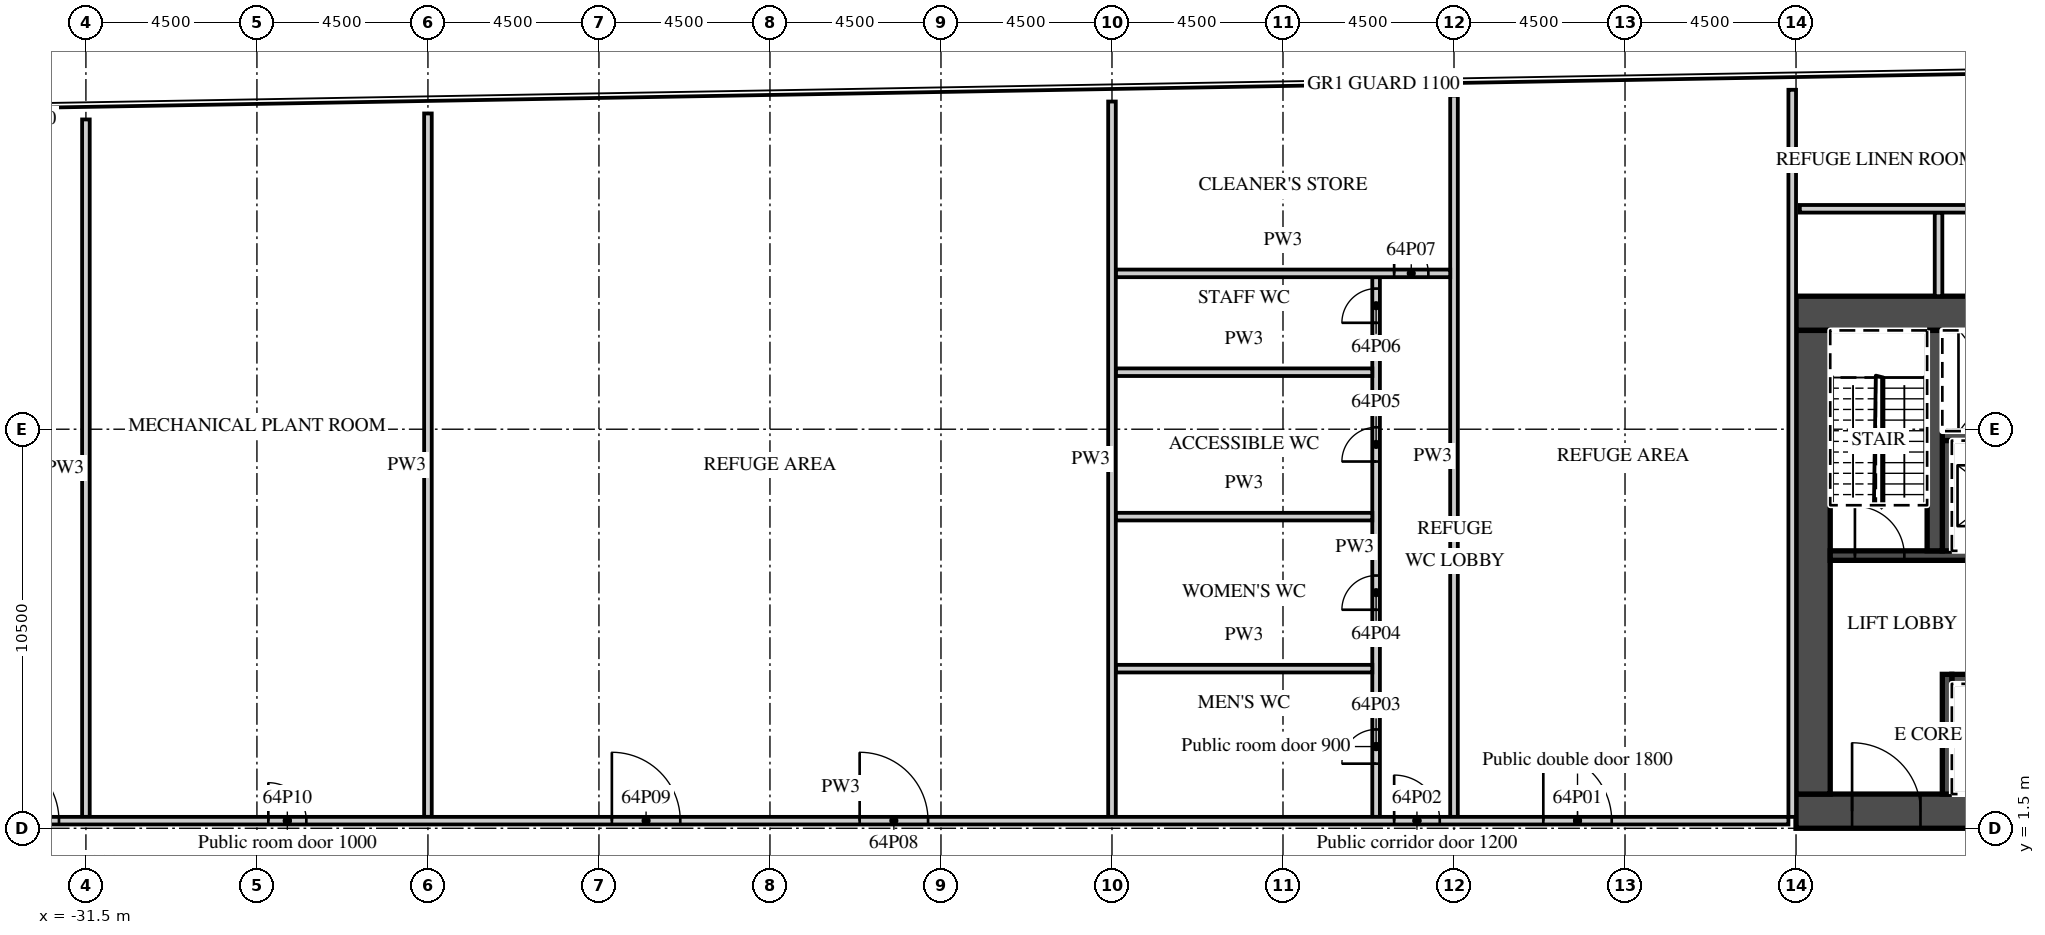
"""IFC4 building model, lengths in metres.
Left out: names, types, materials, properties, quantities, classifications, styles, units other than length and angle.
Written with IfcOpenShell. Run it as: python <this file> out.ifc"""

import sys

from ifc_helpers import new_model, si_unit, direction, frame, frame_2d, origin, place, context, subcontext, project, spatial, rectangle, extrude, element, fill, save


model = new_model("IFC4")
c1 = context("Model", 3, precision=1e-05, world=origin(), true_north=direction((0.0, 1.0)))
c2 = subcontext(c1, "Body", "Model", "MODEL_VIEW")
j1 = project(units=[si_unit("LENGTHUNIT", "METRE"), si_unit("PLANEANGLEUNIT", "RADIAN")], contexts=[c1])
p1 = place(None, origin())
s1 = spatial("IfcSite", under=j1, at=p1, CompositionType="ELEMENT")
p2 = place(p1, origin())
s2 = spatial("IfcBuilding", under=s1, at=p2, CompositionType="ELEMENT")
p3 = place(p2, frame((0.0, 0.0, 257.3)))
s3 = spatial("IfcBuildingStorey", under=s2, at=p3, CompositionType="ELEMENT", Elevation=257.3)
p4 = place(p3, frame((13.5, 1.95, 0.0), z_axis=(0.0, 0.0, 1.0), x_axis=(1.0, 0.0, 0.0)))
e1 = element("IfcWall", 1, at=p4, inside=s3, PredefinedType="SHEAR", context=c2, shape_type="SweptSolid", body=[
    extrude(rectangle(XDim=18.0, YDim=0.9, at=frame_2d((9.0, 0.0))), origin(), (0.0, 0.0, 1.0), 4.2),
])
p5 = place(p4, frame((1.475, 0.0, 0.0)))
e2 = element("IfcOpeningElement", 2, at=p5, cuts=e1, PredefinedType="OPENING", context=c2, shape_type="SweptSolid", body=[
    extrude(rectangle(XDim=1.8, YDim=2.1, at=frame_2d((0.9, 1.05))), frame((0.0, 0.46, 0.0), z_axis=(0.0, -1.0, 0.0), x_axis=(1.0, 0.0, 0.0)), (0.0, 0.0, 1.0), 0.92),
])
p6 = place(p3, frame((13.5, 15.05, 0.0), z_axis=(0.0, 0.0, 1.0), x_axis=(1.0, 0.0, 0.0)))
e3 = element("IfcWall", 3, at=p6, inside=s3, PredefinedType="SHEAR", context=c2, shape_type="SweptSolid", body=[
    extrude(rectangle(XDim=6.8, YDim=0.9, at=frame_2d((3.4, 0.0))), origin(), (0.0, 0.0, 1.0), 4.2),
])
p7 = place(p6, frame((4.725, 0.0, 0.0)))
e4 = element("IfcOpeningElement", 4, at=p7, cuts=e3, PredefinedType="OPENING", context=c2, shape_type="SweptSolid", body=[
    extrude(rectangle(XDim=1.2, YDim=2.1, at=frame_2d((0.6, 1.05))), frame((0.0, 0.46, 0.0), z_axis=(0.0, -1.0, 0.0), x_axis=(1.0, 0.0, 0.0)), (0.0, 0.0, 1.0), 0.92),
])
p8 = place(p3, frame((13.95, 2.4, 0.0), z_axis=(0.0, 0.0, 1.0), x_axis=(0.0, 1.0, 0.0)))
e5 = element("IfcWall", 5, at=p8, inside=s3, PredefinedType="SHEAR", context=c2, shape_type="SweptSolid", body=[
    extrude(rectangle(XDim=12.2, YDim=0.9, at=frame_2d((6.1, 0.0))), origin(), (0.0, 0.0, 1.0), 4.2),
])
p9 = place(p3, frame((17.6, 5.425, 0.0), z_axis=(0.0, 0.0, 1.0), x_axis=(1.0, 0.0, 0.0)))
e6 = element("IfcWall", 6, at=p9, inside=s3, PredefinedType="SHEAR", context=c2, shape_type="SweptSolid", body=[
    extrude(rectangle(XDim=13.0, YDim=0.25, at=frame_2d((6.5, 0.0))), origin(), (0.0, 0.0, 1.0), 4.2),
])
p10 = place(p9, frame((8.475, 0.0, 0.0)))
e7 = element("IfcOpeningElement", 7, at=p10, cuts=e6, PredefinedType="OPENING", context=c2, shape_type="SweptSolid", body=[
    extrude(rectangle(XDim=1.2, YDim=2.1, at=frame_2d((0.6, 1.05))), frame((0.0, 0.135, 0.0), z_axis=(0.0, -1.0, 0.0), x_axis=(1.0, 0.0, 0.0)), (0.0, 0.0, 1.0), 0.27),
])
p11 = place(p9, frame((5.875, 0.0, 0.0)))
e8 = element("IfcOpeningElement", 8, at=p11, cuts=e6, PredefinedType="OPENING", context=c2, shape_type="SweptSolid", body=[
    extrude(rectangle(XDim=1.2, YDim=2.1, at=frame_2d((0.6, 1.05))), frame((0.0, 0.135, 0.0), z_axis=(0.0, -1.0, 0.0), x_axis=(1.0, 0.0, 0.0)), (0.0, 0.0, 1.0), 0.27),
])
p12 = place(p3, frame((17.475, 2.4, 0.0), z_axis=(0.0, 0.0, 1.0), x_axis=(0.0, 1.0, 0.0)))
e9 = element("IfcWall", 9, at=p12, inside=s3, PredefinedType="SHEAR", context=c2, shape_type="SweptSolid", body=[
    extrude(rectangle(XDim=3.15, YDim=0.25, at=frame_2d((1.575, 0.0))), origin(), (0.0, 0.0, 1.0), 4.2),
])
p13 = place(p3, frame((14.4, 8.675, 0.0), z_axis=(0.0, 0.0, 1.0), x_axis=(1.0, 0.0, 0.0)))
e10 = element("IfcWall", 10, at=p13, inside=s3, PredefinedType="SHEAR", context=c2, shape_type="SweptSolid", body=[
    extrude(rectangle(XDim=16.2, YDim=0.25, at=frame_2d((8.1, 0.0))), origin(), (0.0, 0.0, 1.0), 4.2),
])
p14 = place(p13, frame((6.45, 0.0, 0.0)))
e11 = element("IfcOpeningElement", 11, at=p14, cuts=e10, PredefinedType="OPENING", context=c2, shape_type="SweptSolid", body=[
    extrude(rectangle(XDim=1.2, YDim=2.1, at=frame_2d((0.6, 1.05))), frame((0.0, 0.135, 0.0), z_axis=(0.0, -1.0, 0.0), x_axis=(1.0, 0.0, 0.0)), (0.0, 0.0, 1.0), 0.27),
])
p15 = place(p13, frame((3.8, 0.0, 0.0)))
e12 = element("IfcOpeningElement", 12, at=p15, cuts=e10, PredefinedType="OPENING", context=c2, shape_type="SweptSolid", body=[
    extrude(rectangle(XDim=1.2, YDim=2.1, at=frame_2d((0.6, 1.05))), frame((0.0, 0.135, 0.0), z_axis=(0.0, -1.0, 0.0), x_axis=(1.0, 0.0, 0.0)), (0.0, 0.0, 1.0), 0.27),
])
p16 = place(p13, frame((0.65, 0.0, 0.0)))
e13 = element("IfcOpeningElement", 13, at=p16, cuts=e10, PredefinedType="OPENING", context=c2, shape_type="SweptSolid", body=[
    extrude(rectangle(XDim=1.3, YDim=2.1, at=frame_2d((0.65, 1.05))), frame((0.0, 0.135, 0.0), z_axis=(0.0, -1.0, 0.0), x_axis=(1.0, 0.0, 0.0)), (0.0, 0.0, 1.0), 0.27),
])
p17 = place(p13, frame((14.113, 0.0, 0.0)))
e14 = element("IfcOpeningElement", 14, at=p17, cuts=e10, PredefinedType="OPENING", context=c2, shape_type="SweptSolid", body=[
    extrude(rectangle(XDim=1.0, YDim=2.1, at=frame_2d((0.5, 1.05))), frame((0.0, 0.135, 0.0), z_axis=(0.0, -1.0, 0.0), x_axis=(1.0, 0.0, 0.0)), (0.0, 0.0, 1.0), 0.27),
])
p18 = place(p13, frame((10.137, 0.0, 0.0)))
e15 = element("IfcOpeningElement", 15, at=p18, cuts=e10, PredefinedType="OPENING", context=c2, shape_type="SweptSolid", body=[
    extrude(rectangle(XDim=1.0, YDim=2.1, at=frame_2d((0.5, 1.05))), frame((0.0, 0.135, 0.0), z_axis=(0.0, -1.0, 0.0), x_axis=(1.0, 0.0, 0.0)), (0.0, 0.0, 1.0), 0.27),
])
p19 = place(p3, frame((17.35, 11.825, 0.0), z_axis=(0.0, 0.0, 1.0), x_axis=(1.0, 0.0, 0.0)))
e16 = element("IfcWall", 16, at=p19, inside=s3, PredefinedType="SHEAR", context=c2, shape_type="SweptSolid", body=[
    extrude(rectangle(XDim=13.25, YDim=0.25, at=frame_2d((6.625, 0.0))), origin(), (0.0, 0.0, 1.0), 4.2),
])
p20 = place(p3, frame((17.475, 8.8, 0.0), z_axis=(0.0, 0.0, 1.0), x_axis=(0.0, 1.0, 0.0)))
e17 = element("IfcWall", 17, at=p20, inside=s3, PredefinedType="SHEAR", context=c2, shape_type="SweptSolid", body=[
    extrude(rectangle(XDim=2.9, YDim=0.25, at=frame_2d((1.45, 0.0))), origin(), (0.0, 0.0, 1.0), 4.2),
])
p21 = place(p3, frame((17.15, 8.8, 0.0), z_axis=(0.0, 0.0, 1.0), x_axis=(0.0, 1.0, 0.0)))
e18 = element("IfcWall", 18, at=p21, inside=s3, PredefinedType="SHEAR", context=c2, shape_type="SweptSolid", body=[
    extrude(rectangle(XDim=5.8, YDim=0.4, at=frame_2d((2.9, 0.0))), origin(), (0.0, 0.0, 1.0), 4.2),
])
p22 = place(p3, frame((17.25, 15.5, 0.0), z_axis=(0.0, 0.0, 1.0), x_axis=(0.0, 1.0, 0.0)))
e19 = element("IfcWall", 19, at=p22, inside=s3, PredefinedType="PARTITIONING", context=c2, shape_type="SweptSolid", body=[
    extrude(rectangle(XDim=2.2, YDim=0.2, at=frame_2d((1.1, 0.0))), origin(), (0.0, 0.0, 1.0), 4.2),
])
p23 = place(p3, frame((13.6, 17.8, 0.0), z_axis=(0.0, 0.0, 1.0), x_axis=(1.0, 0.0, 0.0)))
e20 = element("IfcWall", 20, at=p23, inside=s3, PredefinedType="PARTITIONING", context=c2, shape_type="SweptSolid", body=[
    extrude(rectangle(XDim=28.657, YDim=0.2, at=frame_2d((14.329, 0.0))), origin(), (0.0, 0.0, 1.0), 4.2),
])
p24 = place(p23, frame((16.613, 0.0, 0.0)))
e21 = element("IfcOpeningElement", 21, at=p24, cuts=e20, PredefinedType="OPENING", context=c2, shape_type="SweptSolid", body=[
    extrude(rectangle(XDim=0.9, YDim=2.1, at=frame_2d((0.45, 1.05))), frame((0.0, 0.11, 0.0), z_axis=(0.0, -1.0, 0.0), x_axis=(1.0, 0.0, 0.0)), (0.0, 0.0, 1.0), 0.22),
])
p25 = place(p23, frame((8.312, 0.0, 0.0)))
e22 = element("IfcOpeningElement", 22, at=p25, cuts=e20, PredefinedType="OPENING", context=c2, shape_type="SweptSolid", body=[
    extrude(rectangle(XDim=0.9, YDim=2.1, at=frame_2d((0.45, 1.05))), frame((0.0, 0.11, 0.0), z_axis=(0.0, -1.0, 0.0), x_axis=(1.0, 0.0, 0.0)), (0.0, 0.0, 1.0), 0.22),
])
p26 = place(p3, frame((4.5, 1.8, 0.0), z_axis=(0.0, 0.0, 1.0), x_axis=(0.0, 1.0, 0.0)))
e23 = element("IfcWall", 23, at=p26, inside=s3, PredefinedType="PARTITIONING", context=c2, shape_type="SweptSolid", body=[
    extrude(rectangle(XDim=18.979, YDim=0.2, at=frame_2d((9.49, 0.0))), origin(), (0.0, 0.0, 1.0), 4.2),
])
p27 = place(p3, frame((2.45, 1.8, 0.0), z_axis=(0.0, 0.0, 1.0), x_axis=(0.0, 1.0, 0.0)))
e24 = element("IfcWall", 24, at=p27, inside=s3, PredefinedType="PARTITIONING", context=c2, shape_type="SweptSolid", body=[
    extrude(rectangle(XDim=14.201, YDim=0.2, at=frame_2d((7.1, 0.0))), origin(), (0.0, 0.0, 1.0), 4.2),
])
p28 = place(p27, frame((1.4, 0.0, 0.0)))
e25 = element("IfcOpeningElement", 25, at=p28, cuts=e24, PredefinedType="OPENING", context=c2, shape_type="SweptSolid", body=[
    extrude(rectangle(XDim=0.9, YDim=2.1, at=frame_2d((0.45, 1.05))), frame((0.0, 0.11, 0.0), z_axis=(0.0, -1.0, 0.0), x_axis=(1.0, 0.0, 0.0)), (0.0, 0.0, 1.0), 0.22),
])
p29 = place(p27, frame((5.45, 0.0, 0.0)))
e26 = element("IfcOpeningElement", 26, at=p29, cuts=e24, PredefinedType="OPENING", context=c2, shape_type="SweptSolid", body=[
    extrude(rectangle(XDim=0.9, YDim=2.1, at=frame_2d((0.45, 1.05))), frame((0.0, 0.11, 0.0), z_axis=(0.0, -1.0, 0.0), x_axis=(1.0, 0.0, 0.0)), (0.0, 0.0, 1.0), 0.22),
])
p30 = place(p27, frame((9.35, 0.0, 0.0)))
e27 = element("IfcOpeningElement", 27, at=p30, cuts=e24, PredefinedType="OPENING", context=c2, shape_type="SweptSolid", body=[
    extrude(rectangle(XDim=0.9, YDim=2.1, at=frame_2d((0.45, 1.05))), frame((0.0, 0.11, 0.0), z_axis=(0.0, -1.0, 0.0), x_axis=(1.0, 0.0, 0.0)), (0.0, 0.0, 1.0), 0.22),
])
p31 = place(p27, frame((13.0, 0.0, 0.0)))
e28 = element("IfcOpeningElement", 28, at=p31, cuts=e24, PredefinedType="OPENING", context=c2, shape_type="SweptSolid", body=[
    extrude(rectangle(XDim=0.9, YDim=2.1, at=frame_2d((0.45, 1.05))), frame((0.0, 0.11, 0.0), z_axis=(0.0, -1.0, 0.0), x_axis=(1.0, 0.0, 0.0)), (0.0, 0.0, 1.0), 0.22),
])
for number, where, z_axis, x_axis in (
    (29, (-4.4, 5.7, 0.0), (0.0, 0.0, 1.0), (1.0, 0.0, 0.0)),
    (30, (-4.4, 9.7, 0.0), (0.0, 0.0, 1.0), (1.0, 0.0, 0.0)),
    (31, (-4.4, 13.5, 0.0), (0.0, 0.0, 1.0), (1.0, 0.0, 0.0)),
):
    element("IfcWall", number, at=place(p3, frame(where, z_axis=z_axis, x_axis=x_axis)), inside=s3, PredefinedType="PARTITIONING", context=c2, shape_type="SweptSolid", body=[
        extrude(rectangle(XDim=6.75, YDim=0.2, at=frame_2d((3.375, 0.0))), origin(), (0.0, 0.0, 1.0), 4.2),
    ])
p32 = place(p3, frame((-4.4, 16.101, 0.0), z_axis=(0.0, 0.0, 1.0), x_axis=(1.0, 0.0, 0.0)))
e32 = element("IfcWall", 32, at=p32, inside=s3, PredefinedType="PARTITIONING", context=c2, shape_type="SweptSolid", body=[
    extrude(rectangle(XDim=8.8, YDim=0.2, at=frame_2d((4.4, 0.0))), origin(), (0.0, 0.0, 1.0), 4.2),
])
p33 = place(p32, frame((7.325, 0.0, 0.0)))
e33 = element("IfcOpeningElement", 33, at=p33, cuts=e32, PredefinedType="OPENING", context=c2, shape_type="SweptSolid", body=[
    extrude(rectangle(XDim=0.9, YDim=2.1, at=frame_2d((0.45, 1.05))), frame((0.0, 0.11, 0.0), z_axis=(0.0, -1.0, 0.0), x_axis=(1.0, 0.0, 0.0)), (0.0, 0.0, 1.0), 0.22),
])
p34 = place(p3, frame((-4.5, 1.8, 0.0), z_axis=(0.0, 0.0, 1.0), x_axis=(0.0, 1.0, 0.0)))
e34 = element("IfcWall", 34, at=p34, inside=s3, PredefinedType="PARTITIONING", context=c2, shape_type="SweptSolid", body=[
    extrude(rectangle(XDim=18.822, YDim=0.2, at=frame_2d((9.411, 0.0))), origin(), (0.0, 0.0, 1.0), 4.2),
])
p35 = place(p3, frame((-22.5, 1.8, 0.0), z_axis=(0.0, 0.0, 1.0), x_axis=(0.0, 1.0, 0.0)))
e35 = element("IfcWall", 35, at=p35, inside=s3, PredefinedType="PARTITIONING", context=c2, shape_type="SweptSolid", body=[
    extrude(rectangle(XDim=18.508, YDim=0.2, at=frame_2d((9.254, 0.0))), origin(), (0.0, 0.0, 1.0), 4.2),
])
p36 = place(p3, frame((-31.5, 1.8, 0.0), z_axis=(0.0, 0.0, 1.0), x_axis=(0.0, 1.0, 0.0)))
e36 = element("IfcWall", 36, at=p36, inside=s3, PredefinedType="PARTITIONING", context=c2, shape_type="SweptSolid", body=[
    extrude(rectangle(XDim=18.351, YDim=0.2, at=frame_2d((9.175, 0.0))), origin(), (0.0, 0.0, 1.0), 4.2),
])
p37 = place(p3, frame((-36.572, 1.7, 0.0), z_axis=(0.0, 0.0, 1.0), x_axis=(1.0, 0.0, 0.0)))
e37 = element("IfcWall", 37, at=p37, inside=s3, PredefinedType="PARTITIONING", context=c2, shape_type="SweptSolid", body=[
    extrude(rectangle(XDim=49.872, YDim=0.2, at=frame_2d((24.936, 0.0))), origin(), (0.0, 0.0, 1.0), 4.2),
])
p38 = place(p37, frame((43.422, 0.0, 0.0)))
e38 = element("IfcOpeningElement", 38, at=p38, cuts=e37, PredefinedType="OPENING", context=c2, shape_type="SweptSolid", body=[
    extrude(rectangle(XDim=1.8, YDim=2.1, at=frame_2d((0.9, 1.05))), frame((0.0, 0.11, 0.0), z_axis=(0.0, -1.0, 0.0), x_axis=(1.0, 0.0, 0.0)), (0.0, 0.0, 1.0), 0.22),
])
p39 = place(p37, frame((39.497, 0.0, 0.0)))
e39 = element("IfcOpeningElement", 39, at=p39, cuts=e37, PredefinedType="OPENING", context=c2, shape_type="SweptSolid", body=[
    extrude(rectangle(XDim=1.2, YDim=2.1, at=frame_2d((0.6, 1.05))), frame((0.0, 0.11, 0.0), z_axis=(0.0, -1.0, 0.0), x_axis=(1.0, 0.0, 0.0)), (0.0, 0.0, 1.0), 0.22),
])
p40 = place(p37, frame((25.432, 0.0, 0.0)))
e40 = element("IfcOpeningElement", 40, at=p40, cuts=e37, PredefinedType="OPENING", context=c2, shape_type="SweptSolid", body=[
    extrude(rectangle(XDim=1.8, YDim=2.1, at=frame_2d((0.9, 1.05))), frame((0.0, 0.11, 0.0), z_axis=(0.0, -1.0, 0.0), x_axis=(1.0, 0.0, 0.0)), (0.0, 0.0, 1.0), 0.22),
])
p41 = place(p37, frame((18.912, 0.0, 0.0)))
e41 = element("IfcOpeningElement", 41, at=p41, cuts=e37, PredefinedType="OPENING", context=c2, shape_type="SweptSolid", body=[
    extrude(rectangle(XDim=1.8, YDim=2.1, at=frame_2d((0.9, 1.05))), frame((0.0, 0.11, 0.0), z_axis=(0.0, -1.0, 0.0), x_axis=(1.0, 0.0, 0.0)), (0.0, 0.0, 1.0), 0.22),
])
p42 = place(p37, frame((9.872, 0.0, 0.0)))
e42 = element("IfcOpeningElement", 42, at=p42, cuts=e37, PredefinedType="OPENING", context=c2, shape_type="SweptSolid", body=[
    extrude(rectangle(XDim=1.0, YDim=2.1, at=frame_2d((0.5, 1.05))), frame((0.0, 0.11, 0.0), z_axis=(0.0, -1.0, 0.0), x_axis=(1.0, 0.0, 0.0)), (0.0, 0.0, 1.0), 0.22),
])
p43 = place(p37, frame((2.563, 0.0, 0.0)))
e43 = element("IfcOpeningElement", 43, at=p43, cuts=e37, PredefinedType="OPENING", context=c2, shape_type="SweptSolid", body=[
    extrude(rectangle(XDim=1.8, YDim=2.1, at=frame_2d((0.9, 1.05))), frame((0.0, 0.11, 0.0), z_axis=(0.0, -1.0, 0.0), x_axis=(1.0, 0.0, 0.0)), (0.0, 0.0, 1.0), 0.22),
])
p44 = place(p3, frame((13.4, 1.8, 0.0), z_axis=(0.0, 0.0, 1.0), x_axis=(0.0, 1.0, 0.0)))
e44 = element("IfcWall", 44, at=p44, inside=s3, PredefinedType="PARTITIONING", context=c2, shape_type="SweptSolid", body=[
    extrude(rectangle(XDim=19.131, YDim=0.2, at=frame_2d((9.565, 0.0))), origin(), (0.0, 0.0, 1.0), 4.2),
])
p45 = place(p5, origin())
e45 = element("IfcDoor", 45, at=p45, inside=s3, OperationType="DOUBLE_DOOR_DOUBLE_SWING", PredefinedType="DOOR", context=c2, shape_type="SweptSolid", body=[
    extrude(rectangle(XDim=1.8, YDim=2.1, at=frame_2d((0.9, 1.05))), frame((0.0, 0.025, 0.0), z_axis=(0.0, -1.0, 0.0), x_axis=(1.0, 0.0, 0.0)), (0.0, 0.0, 1.0), 0.05),
])
fill(e2, e45)
p46 = place(p16, origin())
e46 = element("IfcDoor", 46, at=p46, inside=s3, OperationType="SINGLE_SWING_LEFT", PredefinedType="DOOR", context=c2, shape_type="SweptSolid", body=[
    extrude(rectangle(XDim=1.3, YDim=2.1, at=frame_2d((0.65, 1.05))), frame((0.0, 0.025, 0.0), z_axis=(0.0, -1.0, 0.0), x_axis=(1.0, 0.0, 0.0)), (0.0, 0.0, 1.0), 0.05),
])
fill(e13, e46)
p47 = place(p38, origin())
e47 = element("IfcDoor", 47, at=p47, inside=s3, OperationType="DOUBLE_DOOR_DOUBLE_SWING", PredefinedType="DOOR", context=c2, shape_type="SweptSolid", body=[
    extrude(rectangle(XDim=1.8, YDim=2.1, at=frame_2d((0.9, 1.05))), frame((0.0, 0.025, 0.0), z_axis=(0.0, -1.0, 0.0), x_axis=(1.0, 0.0, 0.0)), (0.0, 0.0, 1.0), 0.05),
])
fill(e38, e47)
p48 = place(p39, origin())
e48 = element("IfcDoor", 48, at=p48, inside=s3, OperationType="SINGLE_SWING_LEFT", PredefinedType="DOOR", context=c2, shape_type="SweptSolid", body=[
    extrude(rectangle(XDim=1.2, YDim=2.1, at=frame_2d((0.6, 1.05))), frame((0.0, 0.025, 0.0), z_axis=(0.0, -1.0, 0.0), x_axis=(1.0, 0.0, 0.0)), (0.0, 0.0, 1.0), 0.05),
])
fill(e39, e48)
p49 = place(p28, origin())
e49 = element("IfcDoor", 49, at=p49, inside=s3, OperationType="SINGLE_SWING_LEFT", PredefinedType="DOOR", context=c2, shape_type="SweptSolid", body=[
    extrude(rectangle(XDim=0.9, YDim=2.1, at=frame_2d((0.45, 1.05))), frame((0.0, 0.025, 0.0), z_axis=(0.0, -1.0, 0.0), x_axis=(1.0, 0.0, 0.0)), (0.0, 0.0, 1.0), 0.05),
])
fill(e25, e49)
p50 = place(p29, origin())
e50 = element("IfcDoor", 50, at=p50, inside=s3, OperationType="SINGLE_SWING_LEFT", PredefinedType="DOOR", context=c2, shape_type="SweptSolid", body=[
    extrude(rectangle(XDim=0.9, YDim=2.1, at=frame_2d((0.45, 1.05))), frame((0.0, 0.025, 0.0), z_axis=(0.0, -1.0, 0.0), x_axis=(1.0, 0.0, 0.0)), (0.0, 0.0, 1.0), 0.05),
])
fill(e26, e50)
p51 = place(p30, origin())
e51 = element("IfcDoor", 51, at=p51, inside=s3, OperationType="SINGLE_SWING_LEFT", PredefinedType="DOOR", context=c2, shape_type="SweptSolid", body=[
    extrude(rectangle(XDim=0.9, YDim=2.1, at=frame_2d((0.45, 1.05))), frame((0.0, 0.025, 0.0), z_axis=(0.0, -1.0, 0.0), x_axis=(1.0, 0.0, 0.0)), (0.0, 0.0, 1.0), 0.05),
])
fill(e27, e51)
p52 = place(p31, origin())
e52 = element("IfcDoor", 52, at=p52, inside=s3, OperationType="SINGLE_SWING_LEFT", PredefinedType="DOOR", context=c2, shape_type="SweptSolid", body=[
    extrude(rectangle(XDim=0.9, YDim=2.1, at=frame_2d((0.45, 1.05))), frame((0.0, 0.025, 0.0), z_axis=(0.0, -1.0, 0.0), x_axis=(1.0, 0.0, 0.0)), (0.0, 0.0, 1.0), 0.05),
])
fill(e28, e52)
p53 = place(p33, origin())
e53 = element("IfcDoor", 53, at=p53, inside=s3, OperationType="SINGLE_SWING_LEFT", PredefinedType="DOOR", context=c2, shape_type="SweptSolid", body=[
    extrude(rectangle(XDim=0.9, YDim=2.1, at=frame_2d((0.45, 1.05))), frame((0.0, 0.025, 0.0), z_axis=(0.0, -1.0, 0.0), x_axis=(1.0, 0.0, 0.0)), (0.0, 0.0, 1.0), 0.05),
])
fill(e33, e53)
p54 = place(p40, origin())
e54 = element("IfcDoor", 54, at=p54, inside=s3, OperationType="DOUBLE_DOOR_DOUBLE_SWING", PredefinedType="DOOR", context=c2, shape_type="SweptSolid", body=[
    extrude(rectangle(XDim=1.8, YDim=2.1, at=frame_2d((0.9, 1.05))), frame((0.0, 0.025, 0.0), z_axis=(0.0, -1.0, 0.0), x_axis=(1.0, 0.0, 0.0)), (0.0, 0.0, 1.0), 0.05),
])
fill(e40, e54)
p55 = place(p41, origin())
e55 = element("IfcDoor", 55, at=p55, inside=s3, OperationType="DOUBLE_DOOR_DOUBLE_SWING", PredefinedType="DOOR", context=c2, shape_type="SweptSolid", body=[
    extrude(rectangle(XDim=1.8, YDim=2.1, at=frame_2d((0.9, 1.05))), frame((0.0, 0.025, 0.0), z_axis=(0.0, -1.0, 0.0), x_axis=(1.0, 0.0, 0.0)), (0.0, 0.0, 1.0), 0.05),
])
fill(e41, e55)
p56 = place(p42, origin())
e56 = element("IfcDoor", 56, at=p56, inside=s3, OperationType="SINGLE_SWING_LEFT", PredefinedType="DOOR", context=c2, shape_type="SweptSolid", body=[
    extrude(rectangle(XDim=1.0, YDim=2.1, at=frame_2d((0.5, 1.05))), frame((0.0, 0.025, 0.0), z_axis=(0.0, -1.0, 0.0), x_axis=(1.0, 0.0, 0.0)), (0.0, 0.0, 1.0), 0.05),
])
fill(e42, e56)
p57 = place(p43, origin())
e57 = element("IfcDoor", 57, at=p57, inside=s3, OperationType="DOUBLE_DOOR_DOUBLE_SWING", PredefinedType="DOOR", context=c2, shape_type="SweptSolid", body=[
    extrude(rectangle(XDim=1.8, YDim=2.1, at=frame_2d((0.9, 1.05))), frame((0.0, 0.025, 0.0), z_axis=(0.0, -1.0, 0.0), x_axis=(1.0, 0.0, 0.0)), (0.0, 0.0, 1.0), 0.05),
])
fill(e43, e57)
save(model, sys.argv[1])
